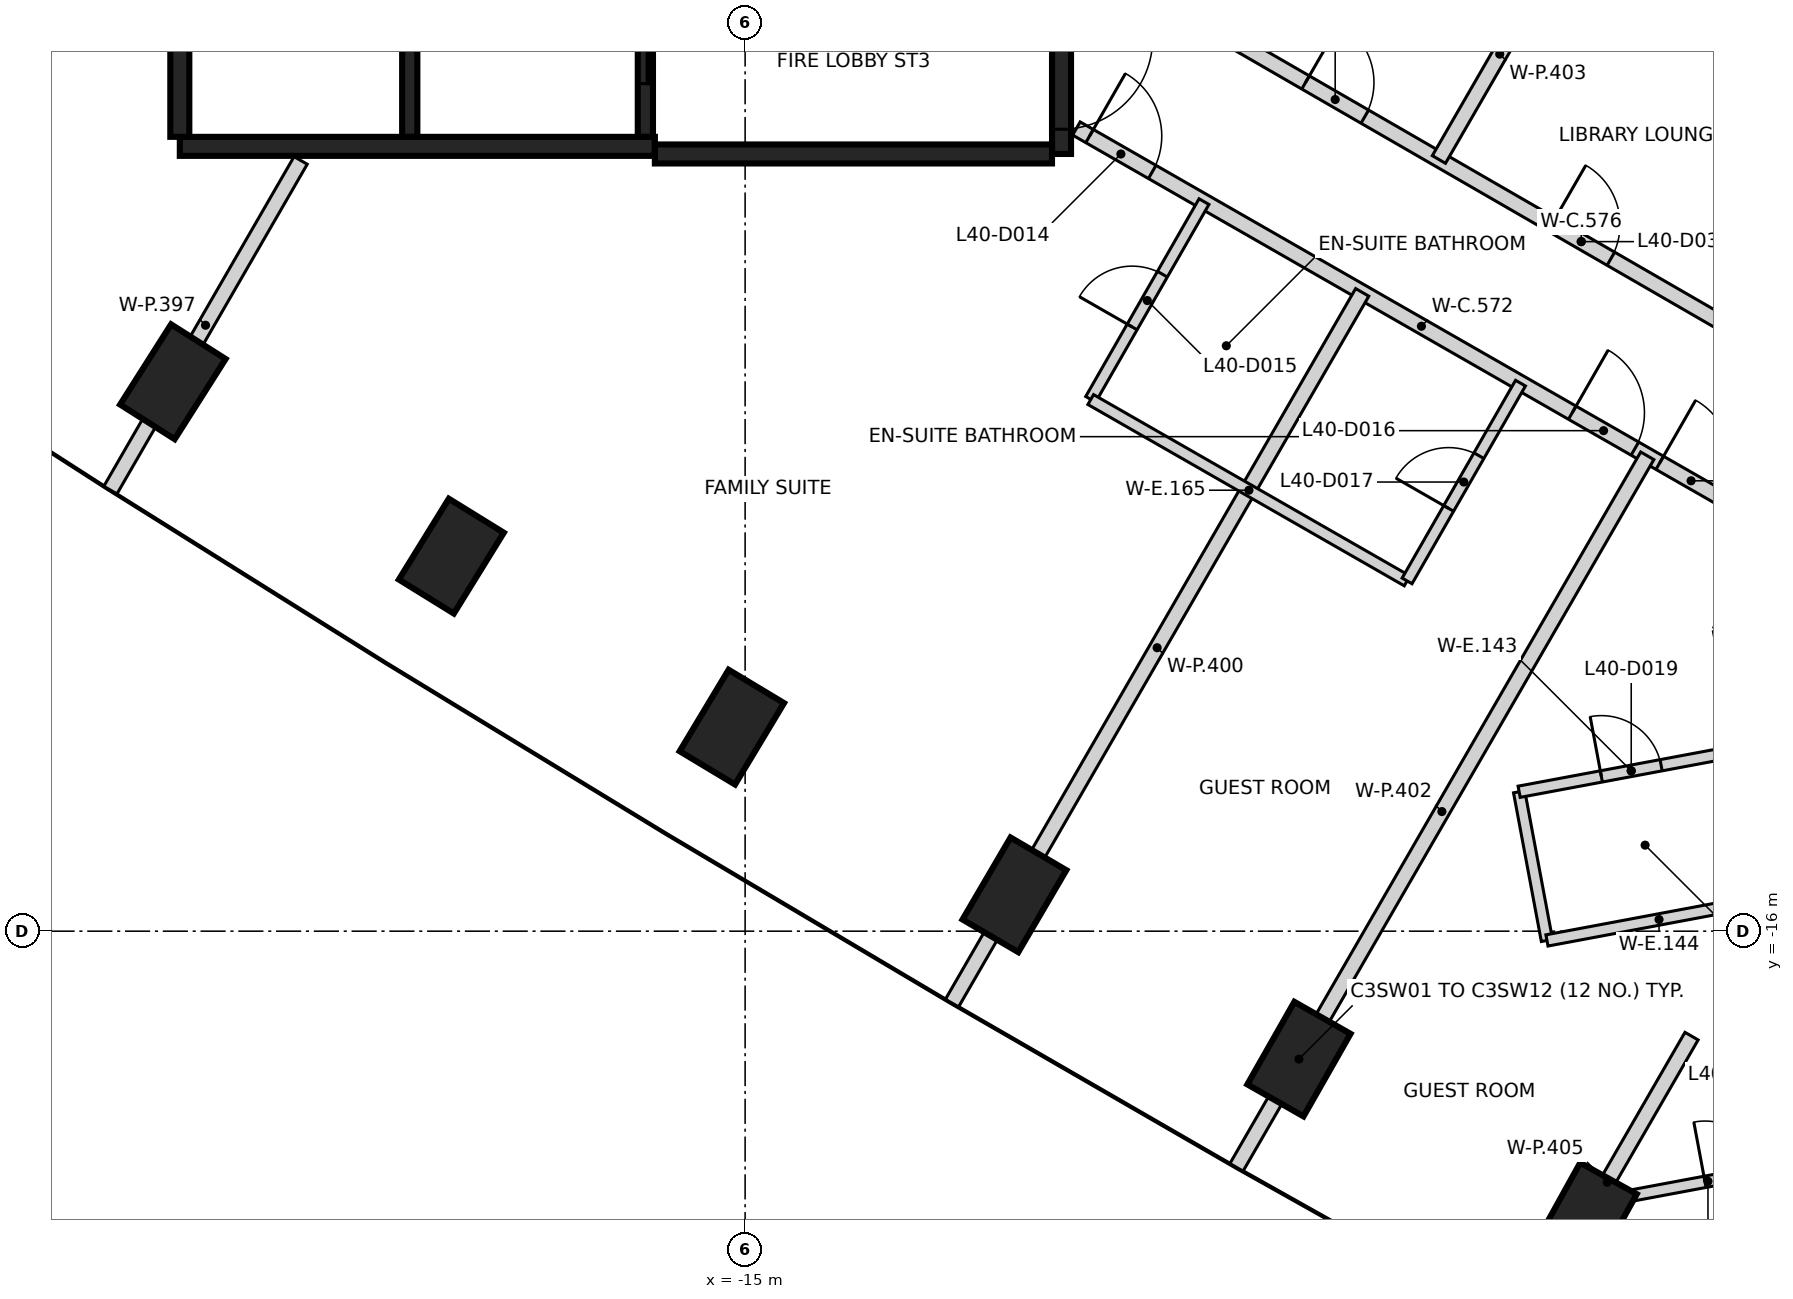
"""IFC4 building model, lengths in metres.
Left out: names, types, materials, properties, quantities, classifications, styles, units other than length and angle.
Written with IfcOpenShell. Run it as: python <this file> out.ifc"""

import sys

from ifc_helpers import new_model, si_unit, direction, frame, frame_2d, origin, origin_2d, place, context, subcontext, project, spatial, rectangle, extrude, element, fill, save


model = new_model("IFC4")
c1 = context("Model", 3, precision=1e-05, world=origin(), true_north=direction((0.0, 1.0)))
c2 = subcontext(c1, "Body", "Model", "MODEL_VIEW")
j1 = project(units=[si_unit("LENGTHUNIT", "METRE"), si_unit("PLANEANGLEUNIT", "RADIAN")], contexts=[c1])
p1 = place(None, origin())
s1 = spatial("IfcSite", under=j1, at=p1, CompositionType="ELEMENT")
p2 = place(p1, origin())
s2 = spatial("IfcBuilding", under=s1, at=p2, CompositionType="ELEMENT")
p3 = place(p2, frame((0.0, 0.0, 161.2)))
s3 = spatial("IfcBuildingStorey", under=s2, at=p3, CompositionType="ELEMENT", Elevation=161.2)
for number, where, z_axis, x_axis in (
    (1, (-22.529, -8.772, -0.4), (0.0, 0.0, 1.0), (0.536, 0.844, 0.0)),
    (2, (-18.865, -11.066, -0.4), (0.0, 0.0, 1.0), (0.526, 0.851, 0.0)),
    (3, (-15.175, -13.316, -0.4), (0.0, 0.0, 1.0), (0.515, 0.857, 0.0)),
    (4, (-11.457, -15.522, -0.4), (0.0, 0.0, 1.0), (0.505, 0.863, 0.0)),
    (5, (-7.714, -17.683, -0.4), (0.0, 0.0, 1.0), (0.495, 0.869, 0.0)),
    (6, (-3.945, -19.8, -0.4), (0.0, 0.0, 1.0), (0.485, 0.875, 0.0)),
):
    element("IfcColumn", number, at=place(p3, frame(where, z_axis=z_axis, x_axis=x_axis)), inside=s3, PredefinedType="COLUMN", context=c2, shape_type="SweptSolid", body=[
        extrude(rectangle(XDim=1.25, YDim=0.85, at=origin_2d()), origin(), (0.0, 0.0, 1.0), 2.884),
    ])
p4 = place(p3, frame((-10.837, 5.775, 0.0), z_axis=(0.0, 0.0, 1.0), x_axis=(0.0, -1.0, 0.0)))
e7 = element("IfcWall", 7, at=p4, inside=s3, PredefinedType="SHEAR", context=c2, shape_type="SweptSolid", body=[
    extrude(rectangle(XDim=11.55, YDim=0.25, at=frame_2d((5.775, 0.0))), origin(), (0.0, 0.0, 1.0), 3.2),
])
p5 = place(p4, frame((10.025, 0.0, 0.0)))
e8 = element("IfcOpeningElement", 8, at=p5, cuts=e7, PredefinedType="OPENING", context=c2, shape_type="SweptSolid", body=[
    extrude(rectangle(XDim=1.2, YDim=2.1, at=frame_2d((0.6, 1.05))), frame((0.0, 0.135, 0.0), z_axis=(0.0, -1.0, 0.0), x_axis=(1.0, 0.0, 0.0)), (0.0, 0.0, 1.0), 0.27),
])
p6 = place(p4, frame((8.725, 0.0, 0.0)))
e9 = element("IfcOpeningElement", 9, at=p6, cuts=e7, PredefinedType="OPENING", context=c2, shape_type="SweptSolid", body=[
    extrude(rectangle(XDim=1.2, YDim=2.1, at=frame_2d((0.6, 1.05))), frame((0.0, 0.135, 0.0), z_axis=(0.0, -1.0, 0.0), x_axis=(1.0, 0.0, 0.0)), (0.0, 0.0, 1.0), 0.27),
])
p7 = place(p3, frame((-16.187, -5.675, 0.0), z_axis=(0.0, 0.0, 1.0), x_axis=(-1.0, 0.0, 0.0)))
e10 = element("IfcWall", 10, at=p7, inside=s3, PredefinedType="SHEAR", context=c2, shape_type="SweptSolid", body=[
    extrude(rectangle(XDim=6.25, YDim=0.25, at=frame_2d((3.125, 0.0))), origin(), (0.0, 0.0, 1.0), 3.2),
])
p8 = place(p3, frame((-10.963, -5.775, 0.0), z_axis=(0.0, 0.0, 1.0), x_axis=(-1.0, 0.0, 0.0)))
e11 = element("IfcWall", 11, at=p8, inside=s3, PredefinedType="SHEAR", context=c2, shape_type="SweptSolid", body=[
    extrude(rectangle(XDim=5.225, YDim=0.25, at=frame_2d((2.612, 0.0))), origin(), (0.0, 0.0, 1.0), 3.2),
])
p9 = place(p3, frame((-22.437, -5.55, 0.0), z_axis=(0.0, 0.0, 1.0), x_axis=(0.0, 1.0, 0.0)))
e12 = element("IfcWall", 12, at=p9, inside=s3, PredefinedType="SHEAR", context=c2, shape_type="SweptSolid", body=[
    extrude(rectangle(XDim=1.849, YDim=0.25, at=frame_2d((0.925, 0.0))), origin(), (0.0, 0.0, 1.0), 3.2),
])
p10 = place(p3, frame((-16.312, -2.898, 0.0), z_axis=(0.0, 0.0, 1.0), x_axis=(0.0, -1.0, 0.0)))
e13 = element("IfcWall", 13, at=p10, inside=s3, PredefinedType="SHEAR", context=c2, shape_type="SweptSolid", body=[
    extrude(rectangle(XDim=2.651, YDim=0.2, at=frame_2d((1.325, 0.0))), origin(), (0.0, 0.0, 1.0), 3.2),
])
p11 = place(p10, frame((0.652, 0.0, 0.0)))
e14 = element("IfcOpeningElement", 14, at=p11, cuts=e13, PredefinedType="OPENING", context=c2, shape_type="SweptSolid", body=[
    extrude(rectangle(XDim=1.3, YDim=2.1, at=frame_2d((0.65, 1.05))), frame((0.0, 0.11, 0.0), z_axis=(0.0, -1.0, 0.0), x_axis=(1.0, 0.0, 0.0)), (0.0, 0.0, 1.0), 0.22),
])
p12 = place(p3, frame((-19.412, -5.549, 0.0), z_axis=(0.0, 0.0, 1.0), x_axis=(0.0, 1.0, 0.0)))
e15 = element("IfcWall", 15, at=p12, inside=s3, PredefinedType="SHEAR", context=c2, shape_type="SweptSolid", body=[
    extrude(rectangle(XDim=2.651, YDim=0.2, at=frame_2d((1.325, 0.0))), origin(), (0.0, 0.0, 1.0), 3.2),
])
p13 = place(p3, frame((-10.642, -5.44, 0.0), z_axis=(0.0, 0.0, 1.0), x_axis=(0.867610688994, -0.497244097344, 0.0)))
e16 = element("IfcWall", 16, at=p13, inside=s3, PredefinedType="PARTITIONING", context=c2, shape_type="SweptSolid", body=[
    extrude(rectangle(XDim=10.464, YDim=0.2, at=frame_2d((5.232, 0.0))), origin(), (0.0, 0.0, 1.0), 3.2),
])
p14 = place(p13, frame((0.2, 0.0, 0.0)))
e17 = element("IfcOpeningElement", 17, at=p14, cuts=e16, PredefinedType="OPENING", context=c2, shape_type="SweptSolid", body=[
    extrude(rectangle(XDim=0.95, YDim=2.1, at=frame_2d((0.475, 1.05))), frame((0.0, 0.11, 0.0), z_axis=(0.0, -1.0, 0.0), x_axis=(1.0, 0.0, 0.0)), (0.0, 0.0, 1.0), 0.22),
])
p15 = place(p13, frame((7.519, 0.0, 0.0)))
e18 = element("IfcOpeningElement", 18, at=p15, cuts=e16, PredefinedType="OPENING", context=c2, shape_type="SweptSolid", body=[
    extrude(rectangle(XDim=0.95, YDim=2.1, at=frame_2d((0.475, 1.05))), frame((0.0, 0.11, 0.0), z_axis=(0.0, -1.0, 0.0), x_axis=(1.0, 0.0, 0.0)), (0.0, 0.0, 1.0), 0.22),
])
p16 = place(p13, frame((8.846, 0.0, 0.0)))
e19 = element("IfcOpeningElement", 19, at=p16, cuts=e16, PredefinedType="OPENING", context=c2, shape_type="SweptSolid", body=[
    extrude(rectangle(XDim=0.95, YDim=2.1, at=frame_2d((0.475, 1.05))), frame((0.0, 0.11, 0.0), z_axis=(0.0, -1.0, 0.0), x_axis=(1.0, 0.0, 0.0)), (0.0, 0.0, 1.0), 0.22),
])
p17 = place(p3, frame((-8.612, -4.265, 0.0), z_axis=(0.0, 0.0, 1.0), x_axis=(0.865984415152, -0.500070987675, 0.0)))
e20 = element("IfcWall", 20, at=p17, inside=s3, PredefinedType="PARTITIONING", context=c2, shape_type="SweptSolid", body=[
    extrude(rectangle(XDim=10.651, YDim=0.2, at=frame_2d((5.326, 0.0))), origin(), (0.0, 0.0, 1.0), 3.2),
])
p18 = place(p17, frame((1.138, 0.0, 0.0)))
e21 = element("IfcOpeningElement", 21, at=p18, cuts=e20, PredefinedType="OPENING", context=c2, shape_type="SweptSolid", body=[
    extrude(rectangle(XDim=0.9, YDim=2.1, at=frame_2d((0.45, 1.05))), frame((0.0, 0.11, 0.0), z_axis=(0.0, -1.0, 0.0), x_axis=(1.0, 0.0, 0.0)), (0.0, 0.0, 1.0), 0.22),
])
p19 = place(p17, frame((4.876, 0.0, 0.0)))
e22 = element("IfcOpeningElement", 22, at=p19, cuts=e20, PredefinedType="OPENING", context=c2, shape_type="SweptSolid", body=[
    extrude(rectangle(XDim=0.9, YDim=2.1, at=frame_2d((0.45, 1.05))), frame((0.0, 0.11, 0.0), z_axis=(0.0, -1.0, 0.0), x_axis=(1.0, 0.0, 0.0)), (0.0, 0.0, 1.0), 0.22),
])
p20 = place(p17, frame((8.613, 0.0, 0.0)))
e23 = element("IfcOpeningElement", 23, at=p20, cuts=e20, PredefinedType="OPENING", context=c2, shape_type="SweptSolid", body=[
    extrude(rectangle(XDim=0.9, YDim=2.1, at=frame_2d((0.45, 1.05))), frame((0.0, 0.11, 0.0), z_axis=(0.0, -1.0, 0.0), x_axis=(1.0, 0.0, 0.0)), (0.0, 0.0, 1.0), 0.22),
])
p21 = place(p3, frame((-23.351, -10.197, 0.0), z_axis=(0.0, 0.0, 1.0), x_axis=(0.499872996861, 0.866098716665, 0.0)))
e24 = element("IfcWall", 24, at=p21, inside=s3, PredefinedType="PARTITIONING", context=c2, shape_type="SweptSolid", body=[
    extrude(rectangle(XDim=5.007, YDim=0.2, at=frame_2d((2.503, 0.0))), origin(), (0.0, 0.0, 1.0), 3.2),
])
p22 = place(p3, frame((-12.278, -16.946, 0.0), z_axis=(0.0, 0.0, 1.0), x_axis=(0.499882324153, 0.866093333307, 0.0)))
e25 = element("IfcWall", 25, at=p22, inside=s3, PredefinedType="PARTITIONING", context=c2, shape_type="SweptSolid", body=[
    extrude(rectangle(XDim=10.796, YDim=0.2, at=frame_2d((5.398, 0.0))), origin(), (0.0, 0.0, 1.0), 3.2),
])
p23 = place(p3, frame((-8.535, -19.107, 0.0), z_axis=(0.0, 0.0, 1.0), x_axis=(0.499987057201, 0.866032876184, 0.0)))
e26 = element("IfcWall", 26, at=p23, inside=s3, PredefinedType="PARTITIONING", context=c2, shape_type="SweptSolid", body=[
    extrude(rectangle(XDim=10.809, YDim=0.2, at=frame_2d((5.404, 0.0))), origin(), (0.0, 0.0, 1.0), 3.2),
])
p24 = place(p3, frame((-8.0, -0.924, 0.0), z_axis=(0.0, 0.0, 1.0), x_axis=(0.86604129137, -0.499972480886, 0.0)))
e27 = element("IfcWall", 27, at=p24, inside=s3, PredefinedType="PARTITIONING", context=c2, shape_type="SweptSolid", body=[
    extrude(rectangle(XDim=12.932, YDim=0.2, at=frame_2d((6.466, 0.0))), origin(), (0.0, 0.0, 1.0), 2.3),
])
p25 = place(p3, frame((-5.872, -5.848, 0.0), z_axis=(0.0, 0.0, 1.0), x_axis=(0.499872130319, 0.866099216793, 0.0)))
e28 = element("IfcWall", 28, at=p25, inside=s3, PredefinedType="PARTITIONING", context=c2, shape_type="SweptSolid", body=[
    extrude(rectangle(XDim=3.2, YDim=0.2, at=frame_2d((1.6, 0.0))), origin(), (0.0, 0.0, 1.0), 2.3),
])
p26 = place(p3, frame((-4.767, -21.223, 0.0), z_axis=(0.0, 0.0, 1.0), x_axis=(0.49992092869, 0.866071050814, 0.0)))
e29 = element("IfcWall", 29, at=p26, inside=s3, PredefinedType="PARTITIONING", context=c2, shape_type="SweptSolid", body=[
    extrude(rectangle(XDim=4.437, YDim=0.2, at=frame_2d((2.218, 0.0))), origin(), (0.0, 0.0, 1.0), 3.2),
])
p27 = place(p3, frame((-10.454, -9.003, 0.0), z_axis=(0.0, 0.0, 1.0), x_axis=(0.49740127306, 0.867520589703, 0.0)))
e30 = element("IfcWall", 30, at=p27, inside=s3, PredefinedType="PARTITIONING", context=c2, shape_type="SweptSolid", body=[
    extrude(rectangle(XDim=2.998, YDim=0.15, at=frame_2d((1.499, 0.0))), origin(), (0.0, 0.0, 1.0), 3.2),
])
p28 = place(p27, frame((1.098, 0.0, 0.0)))
e31 = element("IfcOpeningElement", 31, at=p28, cuts=e30, PredefinedType="OPENING", context=c2, shape_type="SweptSolid", body=[
    extrude(rectangle(XDim=0.8, YDim=2.1, at=frame_2d((0.4, 1.05))), frame((0.0, 0.085, 0.0), z_axis=(0.0, -1.0, 0.0), x_axis=(1.0, 0.0, 0.0)), (0.0, 0.0, 1.0), 0.17),
])
p29 = place(p3, frame((-10.453, -9.006, 0.0), z_axis=(0.0, 0.0, 1.0), x_axis=(0.86760039778, -0.49726205342, 0.0)))
e32 = element("IfcWall", 32, at=p29, inside=s3, PredefinedType="PARTITIONING", context=c2, shape_type="SweptSolid", body=[
    extrude(rectangle(XDim=4.797, YDim=0.15, at=frame_2d((2.399, 0.0))), origin(), (0.0, 0.0, 1.0), 3.2),
])
p30 = place(p3, frame((-6.291, -11.392, 0.0), z_axis=(0.0, 0.0, 1.0), x_axis=(0.497409432693, 0.867515911248, 0.0)))
e33 = element("IfcWall", 33, at=p30, inside=s3, PredefinedType="PARTITIONING", context=c2, shape_type="SweptSolid", body=[
    extrude(rectangle(XDim=3.0, YDim=0.15, at=frame_2d((1.5, 0.0))), origin(), (0.0, 0.0, 1.0), 3.2),
])
p31 = place(p30, frame((1.1, 0.0, 0.0)))
e34 = element("IfcOpeningElement", 34, at=p31, cuts=e33, PredefinedType="OPENING", context=c2, shape_type="SweptSolid", body=[
    extrude(rectangle(XDim=0.8, YDim=2.1, at=frame_2d((0.4, 1.05))), frame((0.0, 0.085, 0.0), z_axis=(0.0, -1.0, 0.0), x_axis=(1.0, 0.0, 0.0)), (0.0, 0.0, 1.0), 0.17),
])
p32 = place(p3, frame((-4.817, -14.166, 0.0), z_axis=(0.0, 0.0, 1.0), x_axis=(0.183903339385, -0.982944332993, 0.0)))
e35 = element("IfcWall", 35, at=p32, inside=s3, PredefinedType="PARTITIONING", context=c2, shape_type="SweptSolid", body=[
    extrude(rectangle(XDim=1.99, YDim=0.15, at=frame_2d((0.995, 0.0))), origin(), (0.0, 0.0, 1.0), 3.2),
])
p33 = place(p3, frame((-4.817, -14.166, 0.0), z_axis=(0.0, 0.0, 1.0), x_axis=(0.982987155193, 0.183674311555, 0.0)))
e36 = element("IfcWall", 36, at=p33, inside=s3, PredefinedType="PARTITIONING", context=c2, shape_type="SweptSolid", body=[
    extrude(rectangle(XDim=3.0, YDim=0.15, at=frame_2d((1.5, 0.0))), origin(), (0.0, 0.0, 1.0), 3.2),
])
p34 = place(p33, frame((1.1, 0.0, 0.0)))
e37 = element("IfcOpeningElement", 37, at=p34, cuts=e36, PredefinedType="OPENING", context=c2, shape_type="SweptSolid", body=[
    extrude(rectangle(XDim=0.8, YDim=2.1, at=frame_2d((0.4, 1.05))), frame((0.0, 0.085, 0.0), z_axis=(0.0, -1.0, 0.0), x_axis=(1.0, 0.0, 0.0)), (0.0, 0.0, 1.0), 0.17),
])
p35 = place(p3, frame((-4.451, -16.122, 0.0), z_axis=(0.0, 0.0, 1.0), x_axis=(0.982928336035, 0.18398882091, 0.0)))
e38 = element("IfcWall", 38, at=p35, inside=s3, PredefinedType="PARTITIONING", context=c2, shape_type="SweptSolid", body=[
    extrude(rectangle(XDim=3.0, YDim=0.15, at=frame_2d((1.5, 0.0))), origin(), (0.0, 0.0, 1.0), 3.2),
])
p36 = place(p3, frame((-3.807, -19.566, 0.0), z_axis=(0.0, 0.0, 1.0), x_axis=(0.982987155193, 0.183674311555, 0.0)))
e39 = element("IfcWall", 39, at=p36, inside=s3, PredefinedType="PARTITIONING", context=c2, shape_type="SweptSolid", body=[
    extrude(rectangle(XDim=3.0, YDim=0.15, at=frame_2d((1.5, 0.0))), origin(), (0.0, 0.0, 1.0), 3.2),
])
p37 = place(p36, frame((1.46, 0.0, 0.0)))
e40 = element("IfcOpeningElement", 40, at=p37, cuts=e39, PredefinedType="OPENING", context=c2, shape_type="SweptSolid", body=[
    extrude(rectangle(XDim=0.8, YDim=2.1, at=frame_2d((0.4, 1.05))), frame((0.0, 0.085, 0.0), z_axis=(0.0, -1.0, 0.0), x_axis=(1.0, 0.0, 0.0)), (0.0, 0.0, 1.0), 0.17),
])
p38 = place(p11, origin())
e41 = element("IfcDoor", 41, at=p38, inside=s3, OperationType="SLIDING_TO_LEFT", PredefinedType="DOOR", context=c2, shape_type="SweptSolid", body=[
    extrude(rectangle(XDim=1.3, YDim=2.1, at=frame_2d((0.65, 1.05))), frame((0.0, 0.025, 0.0), z_axis=(0.0, -1.0, 0.0), x_axis=(1.0, 0.0, 0.0)), (0.0, 0.0, 1.0), 0.05),
])
fill(e14, e41)
p39 = place(p5, origin())
e42 = element("IfcDoor", 42, at=p39, inside=s3, OperationType="SINGLE_SWING_LEFT", PredefinedType="DOOR", context=c2, shape_type="SweptSolid", body=[
    extrude(rectangle(XDim=1.2, YDim=2.1, at=frame_2d((0.6, 1.05))), frame((0.0, 0.025, 0.0), z_axis=(0.0, -1.0, 0.0), x_axis=(1.0, 0.0, 0.0)), (0.0, 0.0, 1.0), 0.05),
])
fill(e8, e42)
p40 = place(p14, frame((0.95, 0.0, 0.0), z_axis=(0.0, 0.0, 1.0), x_axis=(-1.0, 0.0, 0.0)))
e43 = element("IfcDoor", 43, at=p40, inside=s3, OperationType="SINGLE_SWING_LEFT", PredefinedType="DOOR", context=c2, shape_type="SweptSolid", body=[
    extrude(rectangle(XDim=0.95, YDim=2.1, at=frame_2d((0.475, 1.05))), frame((0.0, 0.025, 0.0), z_axis=(0.0, -1.0, 0.0), x_axis=(1.0, 0.0, 0.0)), (0.0, 0.0, 1.0), 0.05),
])
fill(e17, e43)
p41 = place(p28, origin())
e44 = element("IfcDoor", 44, at=p41, inside=s3, OperationType="SINGLE_SWING_LEFT", PredefinedType="DOOR", context=c2, shape_type="SweptSolid", body=[
    extrude(rectangle(XDim=0.8, YDim=2.1, at=frame_2d((0.4, 1.05))), frame((0.0, 0.025, 0.0), z_axis=(0.0, -1.0, 0.0), x_axis=(1.0, 0.0, 0.0)), (0.0, 0.0, 1.0), 0.05),
])
fill(e31, e44)
p42 = place(p15, frame((0.95, 0.0, 0.0), z_axis=(0.0, 0.0, 1.0), x_axis=(-1.0, 0.0, 0.0)))
e45 = element("IfcDoor", 45, at=p42, inside=s3, OperationType="SINGLE_SWING_LEFT", PredefinedType="DOOR", context=c2, shape_type="SweptSolid", body=[
    extrude(rectangle(XDim=0.95, YDim=2.1, at=frame_2d((0.475, 1.05))), frame((0.0, 0.025, 0.0), z_axis=(0.0, -1.0, 0.0), x_axis=(1.0, 0.0, 0.0)), (0.0, 0.0, 1.0), 0.05),
])
fill(e18, e45)
p43 = place(p31, origin())
e46 = element("IfcDoor", 46, at=p43, inside=s3, OperationType="SINGLE_SWING_LEFT", PredefinedType="DOOR", context=c2, shape_type="SweptSolid", body=[
    extrude(rectangle(XDim=0.8, YDim=2.1, at=frame_2d((0.4, 1.05))), frame((0.0, 0.025, 0.0), z_axis=(0.0, -1.0, 0.0), x_axis=(1.0, 0.0, 0.0)), (0.0, 0.0, 1.0), 0.05),
])
fill(e34, e46)
p44 = place(p16, frame((0.95, 0.0, 0.0), z_axis=(0.0, 0.0, 1.0), x_axis=(-1.0, 0.0, 0.0)))
e47 = element("IfcDoor", 47, at=p44, inside=s3, OperationType="SINGLE_SWING_LEFT", PredefinedType="DOOR", context=c2, shape_type="SweptSolid", body=[
    extrude(rectangle(XDim=0.95, YDim=2.1, at=frame_2d((0.475, 1.05))), frame((0.0, 0.025, 0.0), z_axis=(0.0, -1.0, 0.0), x_axis=(1.0, 0.0, 0.0)), (0.0, 0.0, 1.0), 0.05),
])
fill(e19, e47)
p45 = place(p34, frame((0.8, 0.0, 0.0), z_axis=(0.0, 0.0, 1.0), x_axis=(-1.0, 0.0, 0.0)))
e48 = element("IfcDoor", 48, at=p45, inside=s3, OperationType="SINGLE_SWING_LEFT", PredefinedType="DOOR", context=c2, shape_type="SweptSolid", body=[
    extrude(rectangle(XDim=0.8, YDim=2.1, at=frame_2d((0.4, 1.05))), frame((0.0, 0.025, 0.0), z_axis=(0.0, -1.0, 0.0), x_axis=(1.0, 0.0, 0.0)), (0.0, 0.0, 1.0), 0.05),
])
fill(e37, e48)
p46 = place(p37, frame((0.8, 0.0, 0.0), z_axis=(0.0, 0.0, 1.0), x_axis=(-1.0, 0.0, 0.0)))
e49 = element("IfcDoor", 49, at=p46, inside=s3, OperationType="SINGLE_SWING_LEFT", PredefinedType="DOOR", context=c2, shape_type="SweptSolid", body=[
    extrude(rectangle(XDim=0.8, YDim=2.1, at=frame_2d((0.4, 1.05))), frame((0.0, 0.025, 0.0), z_axis=(0.0, -1.0, 0.0), x_axis=(1.0, 0.0, 0.0)), (0.0, 0.0, 1.0), 0.05),
])
fill(e40, e49)
p47 = place(p18, origin())
e50 = element("IfcDoor", 50, at=p47, inside=s3, OperationType="SINGLE_SWING_LEFT", PredefinedType="DOOR", context=c2, shape_type="SweptSolid", body=[
    extrude(rectangle(XDim=0.9, YDim=2.1, at=frame_2d((0.45, 1.05))), frame((0.0, 0.025, 0.0), z_axis=(0.0, -1.0, 0.0), x_axis=(1.0, 0.0, 0.0)), (0.0, 0.0, 1.0), 0.05),
])
fill(e21, e50)
p48 = place(p19, origin())
e51 = element("IfcDoor", 51, at=p48, inside=s3, OperationType="SINGLE_SWING_LEFT", PredefinedType="DOOR", context=c2, shape_type="SweptSolid", body=[
    extrude(rectangle(XDim=0.9, YDim=2.1, at=frame_2d((0.45, 1.05))), frame((0.0, 0.025, 0.0), z_axis=(0.0, -1.0, 0.0), x_axis=(1.0, 0.0, 0.0)), (0.0, 0.0, 1.0), 0.05),
])
fill(e22, e51)
save(model, sys.argv[1])
